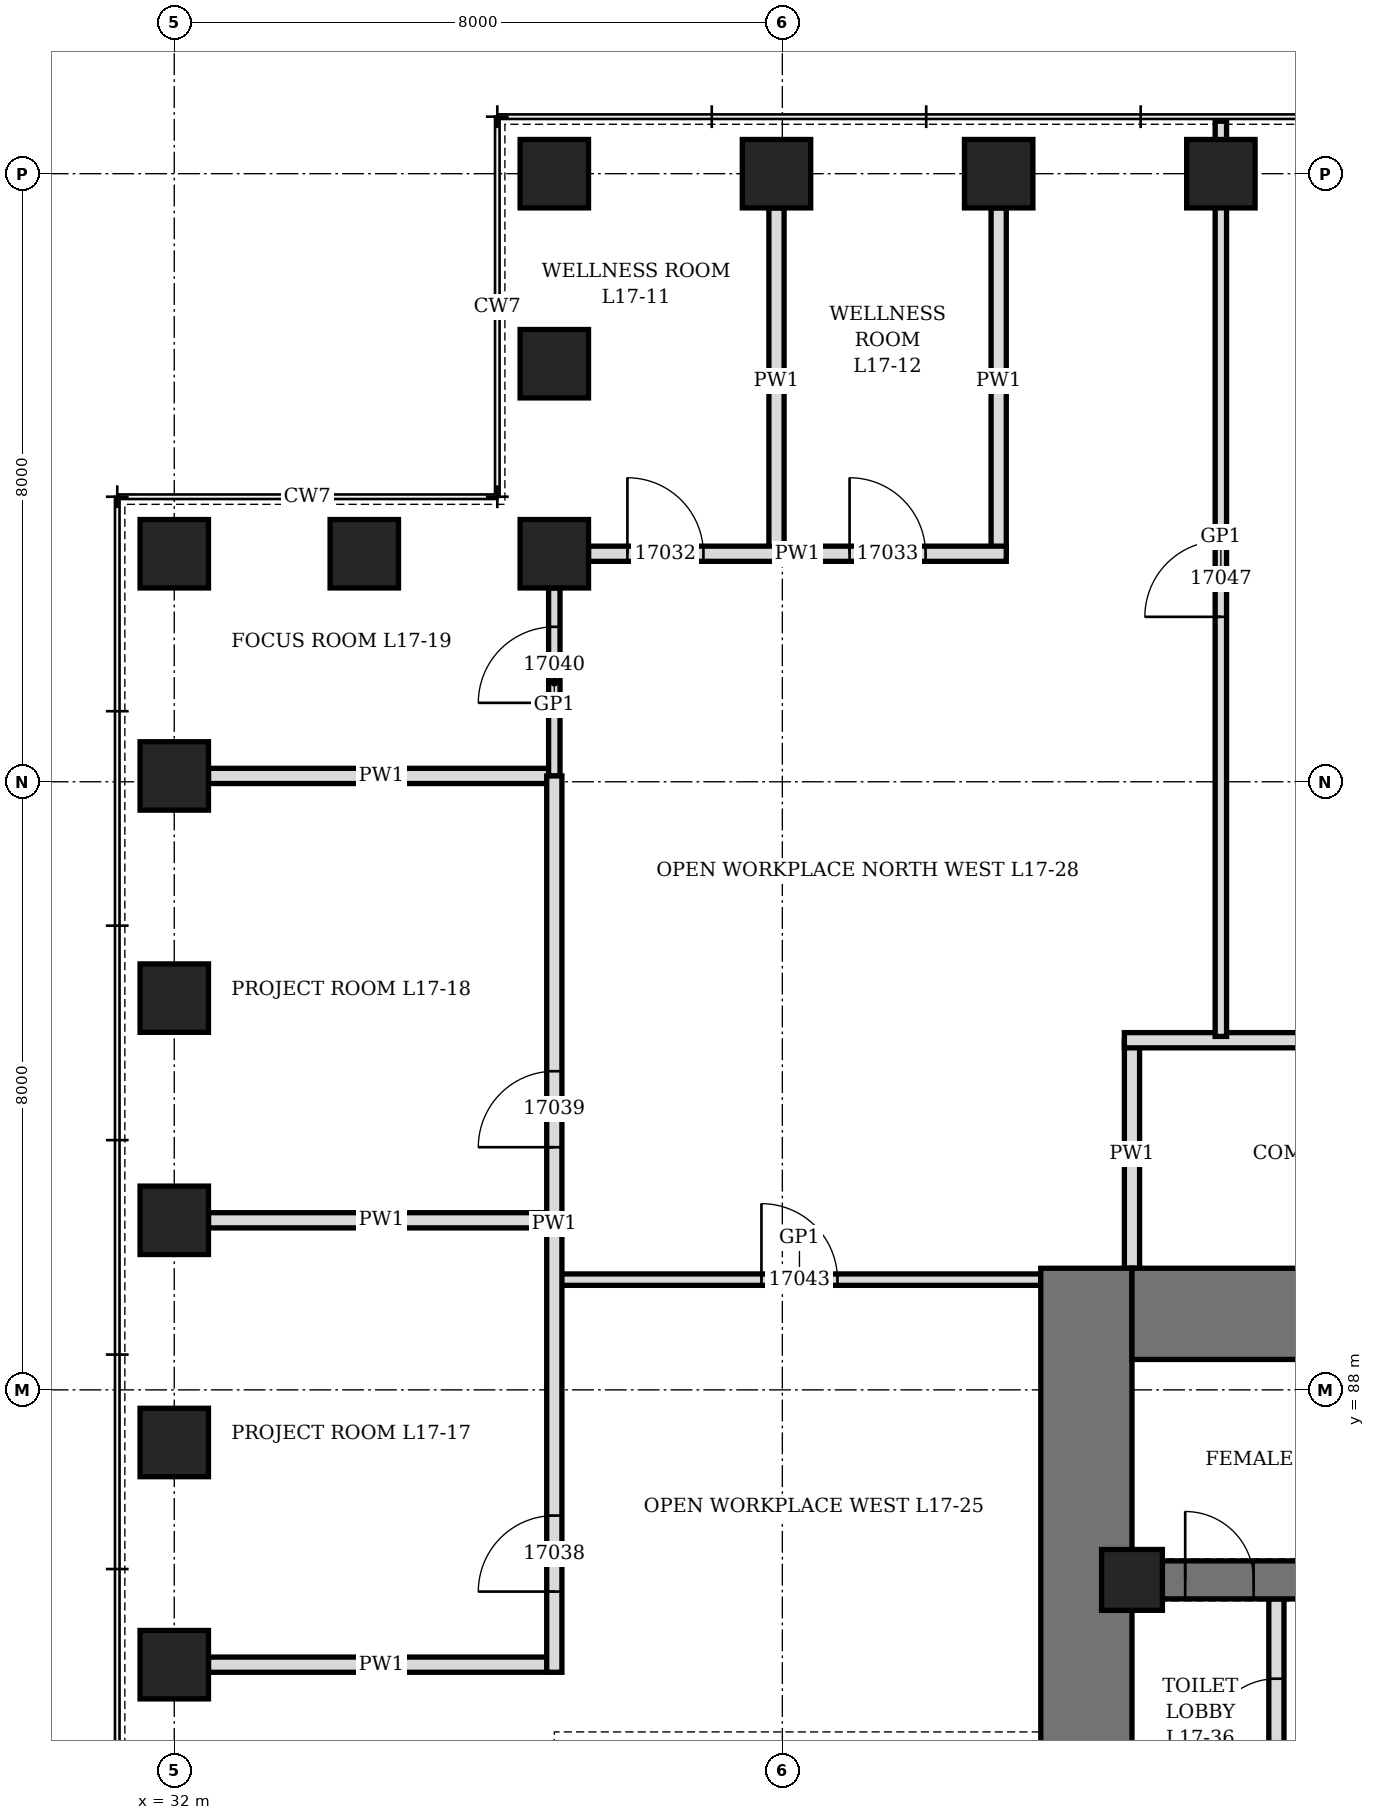
"""IFC4 building model, lengths in metres.
Left out: names, types, materials, properties, quantities, classifications, styles, units other than length and angle.
Written with IfcOpenShell. Run it as: python <this file> out.ifc"""

import sys

from ifc_helpers import new_model, si_unit, direction, frame, frame_2d, origin, origin_2d, place, context, subcontext, project, spatial, rectangle, hollow_rectangle, extrude, element, fill, save


model = new_model("IFC4")
c1 = context("Model", 3, precision=1e-05, world=origin(), true_north=direction((0.0, 1.0)))
c2 = subcontext(c1, "Body", "Model", "MODEL_VIEW")
j1 = project(units=[si_unit("LENGTHUNIT", "METRE"), si_unit("PLANEANGLEUNIT", "RADIAN")], contexts=[c1])
p1 = place(None, origin())
s1 = spatial("IfcSite", under=j1, at=p1, CompositionType="ELEMENT")
p2 = place(p1, origin())
s2 = spatial("IfcBuilding", under=s1, at=p2, CompositionType="ELEMENT")
p3 = place(p2, frame((0.0, 0.0, 81.1)))
s3 = spatial("IfcBuildingStorey", under=s2, at=p3, CompositionType="ELEMENT", Elevation=81.1)
for number, where, z_axis, x_axis in (
    (1, (45.769, 104.0, 0.0), (0.0, 0.0, 1.0), (1.0, 0.0, 0.0)),
    (2, (42.846, 104.0, 0.0), (0.0, 0.0, 1.0), (1.0, 0.0, 0.0)),
    (3, (39.923, 104.0, 0.0), (0.0, 0.0, 1.0), (1.0, 0.0, 0.0)),
    (4, (37.0, 104.0, 0.0), (0.0, 0.0, 1.0), (0.0, 1.0, 0.0)),
    (5, (37.0, 101.5, 0.0), (0.0, 0.0, 1.0), (0.0, 1.0, 0.0)),
    (6, (37.0, 99.0, 0.0), (0.0, 0.0, 1.0), (1.0, 0.0, 0.0)),
    (7, (34.5, 99.0, 0.0), (0.0, 0.0, 1.0), (1.0, 0.0, 0.0)),
    (8, (32.0, 99.0, 0.0), (0.0, 0.0, 1.0), (0.0, 1.0, 0.0)),
    (9, (32.0, 96.077, 0.0), (0.0, 0.0, 1.0), (0.0, 1.0, 0.0)),
    (10, (32.0, 93.154, 0.0), (0.0, 0.0, 1.0), (0.0, 1.0, 0.0)),
    (11, (32.0, 90.231, 0.0), (0.0, 0.0, 1.0), (0.0, 1.0, 0.0)),
    (12, (32.0, 87.308, 0.0), (0.0, 0.0, 1.0), (0.0, 1.0, 0.0)),
    (13, (32.0, 84.385, 0.0), (0.0, 0.0, 1.0), (0.0, 1.0, 0.0)),
):
    element("IfcColumn", number, at=place(p3, frame(where, z_axis=z_axis, x_axis=x_axis)), inside=s3, PredefinedType="COLUMN", context=c2, shape_type="SweptSolid", body=[
        extrude(hollow_rectangle(XDim=0.9, YDim=0.9, WallThickness=0.12, at=origin_2d()), origin(), (0.0, 0.0, 1.0), 4.2),
    ])
p4 = place(p3, frame((44.0, 70.4, 0.0), z_axis=(0.0, 0.0, 1.0), x_axis=(0.0, 1.0, 0.0)))
e14 = element("IfcWall", 14, at=p4, inside=s3, PredefinedType="SHEAR", context=c2, shape_type="SweptSolid", body=[
    extrude(rectangle(XDim=19.2, YDim=1.2, at=frame_2d((9.6, 0.0))), origin(), (0.0, 0.0, 1.0), 4.2),
])
p5 = place(p4, frame((8.6, 0.0, 0.0)))
e15 = element("IfcOpeningElement", 15, at=p5, cuts=e14, PredefinedType="OPENING", context=c2, shape_type="SweptSolid", body=[
    extrude(rectangle(XDim=2.0, YDim=2.4, at=frame_2d((1.0, 1.2))), frame((0.0, 0.61, 0.0), z_axis=(0.0, -1.0, 0.0), x_axis=(1.0, 0.0, 0.0)), (0.0, 0.0, 1.0), 1.22),
])
p6 = place(p3, frame((44.6, 89.0, 0.0), z_axis=(0.0, 0.0, 1.0), x_axis=(1.0, 0.0, 0.0)))
e16 = element("IfcWall", 16, at=p6, inside=s3, PredefinedType="SHEAR", context=c2, shape_type="SweptSolid", body=[
    extrude(rectangle(XDim=22.8, YDim=1.2, at=frame_2d((11.4, 0.0))), origin(), (0.0, 0.0, 1.0), 4.2),
])
p7 = place(p6, frame((6.55, 0.0, 0.0)))
e17 = element("IfcOpeningElement", 17, at=p7, cuts=e16, PredefinedType="OPENING", context=c2, shape_type="SweptSolid", body=[
    extrude(rectangle(XDim=1.0, YDim=2.1, at=frame_2d((0.5, 1.05))), frame((0.0, 0.61, 0.0), z_axis=(0.0, -1.0, 0.0), x_axis=(1.0, 0.0, 0.0)), (0.0, 0.0, 1.0), 1.22),
])
p8 = place(p6, frame((9.45, 0.0, 0.0)))
e18 = element("IfcOpeningElement", 18, at=p8, cuts=e16, PredefinedType="OPENING", context=c2, shape_type="SweptSolid", body=[
    extrude(rectangle(XDim=0.9, YDim=2.1, at=frame_2d((0.45, 1.05))), frame((0.0, 0.61, 0.0), z_axis=(0.0, -1.0, 0.0), x_axis=(1.0, 0.0, 0.0)), (0.0, 0.0, 1.0), 1.22),
])
p9 = place(p6, frame((12.05, 0.0, 0.0)))
e19 = element("IfcOpeningElement", 19, at=p9, cuts=e16, PredefinedType="OPENING", context=c2, shape_type="SweptSolid", body=[
    extrude(rectangle(XDim=0.9, YDim=2.1, at=frame_2d((0.45, 1.05))), frame((0.0, 0.61, 0.0), z_axis=(0.0, -1.0, 0.0), x_axis=(1.0, 0.0, 0.0)), (0.0, 0.0, 1.0), 1.22),
])
p10 = place(p6, frame((13.975, 0.0, 0.0)))
e20 = element("IfcOpeningElement", 20, at=p10, cuts=e16, PredefinedType="OPENING", context=c2, shape_type="SweptSolid", body=[
    extrude(rectangle(XDim=0.9, YDim=2.1, at=frame_2d((0.45, 1.05))), frame((0.0, 0.61, 0.0), z_axis=(0.0, -1.0, 0.0), x_axis=(1.0, 0.0, 0.0)), (0.0, 0.0, 1.0), 1.22),
])
p11 = place(p3, frame((44.6, 85.5, 0.0), z_axis=(0.0, 0.0, 1.0), x_axis=(1.0, 0.0, 0.0)))
e21 = element("IfcWall", 21, at=p11, inside=s3, PredefinedType="SHEAR", context=c2, shape_type="SweptSolid", body=[
    extrude(rectangle(XDim=5.15, YDim=0.5, at=frame_2d((2.575, 0.0))), origin(), (0.0, 0.0, 1.0), 4.2),
])
p12 = place(p11, frame((0.7, 0.0, 0.0)))
e22 = element("IfcOpeningElement", 22, at=p12, cuts=e21, PredefinedType="OPENING", context=c2, shape_type="SweptSolid", body=[
    extrude(rectangle(XDim=0.9, YDim=2.1, at=frame_2d((0.45, 1.05))), frame((0.0, 0.26, 0.0), z_axis=(0.0, -1.0, 0.0), x_axis=(1.0, 0.0, 0.0)), (0.0, 0.0, 1.0), 0.52),
])
p13 = place(p3, frame((44.6, 85.5, 0.0), z_axis=(0.0, 0.0, 1.0), x_axis=(1.0, 0.0, 0.0)))
e23 = element("IfcColumn", 23, at=p13, inside=s3, PredefinedType="COLUMN", context=c2, shape_type="SweptSolid", body=[
    extrude(hollow_rectangle(XDim=0.8, YDim=0.8, WallThickness=0.1, at=origin_2d()), origin(), (0.0, 0.0, 1.0), 4.2),
])
p14 = place(p3, frame((46.5, 82.25, 0.0), z_axis=(0.0, 0.0, 1.0), x_axis=(0.0, 1.0, 0.0)))
e24 = element("IfcWall", 24, at=p14, inside=s3, PredefinedType="PARTITIONING", context=c2, shape_type="SweptSolid", body=[
    extrude(rectangle(XDim=3.0, YDim=0.2, at=frame_2d((1.5, 0.0))), origin(), (0.0, 0.0, 1.0), 4.04),
])
p15 = place(p14, frame((1.05, 0.0, 0.0)))
e25 = element("IfcOpeningElement", 25, at=p15, cuts=e24, PredefinedType="OPENING", context=c2, shape_type="SweptSolid", body=[
    extrude(rectangle(XDim=0.9, YDim=2.1, at=frame_2d((0.45, 1.05))), frame((0.0, 0.11, 0.0), z_axis=(0.0, -1.0, 0.0), x_axis=(1.0, 0.0, 0.0)), (0.0, 0.0, 1.0), 0.22),
])
p16 = place(p3, frame((39.923, 99.0, 0.0), z_axis=(0.0, 0.0, 1.0), x_axis=(0.0, 1.0, 0.0)))
e26 = element("IfcWall", 26, at=p16, inside=s3, PredefinedType="PARTITIONING", context=c2, shape_type="SweptSolid", body=[
    extrude(rectangle(XDim=4.55, YDim=0.2, at=frame_2d((2.275, 0.0))), origin(), (0.0, 0.0, 1.0), 3.428),
])
p17 = place(p3, frame((42.846, 99.0, 0.0), z_axis=(0.0, 0.0, 1.0), x_axis=(0.0, 1.0, 0.0)))
e27 = element("IfcWall", 27, at=p17, inside=s3, PredefinedType="PARTITIONING", context=c2, shape_type="SweptSolid", body=[
    extrude(rectangle(XDim=4.55, YDim=0.2, at=frame_2d((2.275, 0.0))), origin(), (0.0, 0.0, 1.0), 3.278),
])
for number, where, z_axis, x_axis in (
    (28, (32.45, 84.385, 0.0), (0.0, 0.0, 1.0), (1.0, 0.0, 0.0)),
    (29, (32.45, 90.231, 0.0), (0.0, 0.0, 1.0), (1.0, 0.0, 0.0)),
    (30, (32.45, 96.077, 0.0), (0.0, 0.0, 1.0), (1.0, 0.0, 0.0)),
):
    element("IfcWall", number, at=place(p3, frame(where, z_axis=z_axis, x_axis=x_axis)), inside=s3, PredefinedType="PARTITIONING", context=c2, shape_type="SweptSolid", body=[
        extrude(rectangle(XDim=4.55, YDim=0.2, at=frame_2d((2.275, 0.0))), origin(), (0.0, 0.0, 1.0), 3.428),
    ])
p18 = place(p3, frame((44.6, 89.6, 0.0), z_axis=(0.0, 0.0, 1.0), x_axis=(0.0, 1.0, 0.0)))
e31 = element("IfcWall", 31, at=p18, inside=s3, PredefinedType="PARTITIONING", context=c2, shape_type="SweptSolid", body=[
    extrude(rectangle(XDim=3.0, YDim=0.2, at=frame_2d((1.5, 0.0))), origin(), (0.0, 0.0, 1.0), 4.04),
])
p19 = place(p3, frame((37.05, 89.45, 0.0), z_axis=(0.0, 0.0, 1.0), x_axis=(1.0, 0.0, 0.0)))
e32 = element("IfcWall", 32, at=p19, inside=s3, PredefinedType="PARTITIONING", context=c2, shape_type="SweptSolid", body=[
    extrude(rectangle(XDim=6.35, YDim=0.15, at=frame_2d((3.175, 0.0))), origin(), (0.0, 0.0, 1.0), 4.04),
])
p20 = place(p19, frame((2.675, 0.0, 0.0)))
e33 = element("IfcOpeningElement", 33, at=p20, cuts=e32, PredefinedType="OPENING", context=c2, shape_type="SweptSolid", body=[
    extrude(rectangle(XDim=1.0, YDim=2.4, at=frame_2d((0.5, 1.2))), frame((0.0, 0.085, 0.0), z_axis=(0.0, -1.0, 0.0), x_axis=(1.0, 0.0, 0.0)), (0.0, 0.0, 1.0), 0.17),
])
p21 = place(p3, frame((44.5, 92.6, 0.0), z_axis=(0.0, 0.0, 1.0), x_axis=(1.0, 0.0, 0.0)))
e34 = element("IfcWall", 34, at=p21, inside=s3, PredefinedType="PARTITIONING", context=c2, shape_type="SweptSolid", body=[
    extrude(rectangle(XDim=6.4, YDim=0.2, at=frame_2d((3.2, 0.0))), origin(), (0.0, 0.0, 1.0), 4.04),
])
p22 = place(p21, frame((2.7, 0.0, 0.0)))
e35 = element("IfcOpeningElement", 35, at=p22, cuts=e34, PredefinedType="OPENING", context=c2, shape_type="SweptSolid", body=[
    extrude(rectangle(XDim=1.0, YDim=2.1, at=frame_2d((0.5, 1.05))), frame((0.0, 0.11, 0.0), z_axis=(0.0, -1.0, 0.0), x_axis=(1.0, 0.0, 0.0)), (0.0, 0.0, 1.0), 0.22),
])
p23 = place(p3, frame((37.45, 99.0, 0.0), z_axis=(0.0, 0.0, 1.0), x_axis=(1.0, 0.0, 0.0)))
e36 = element("IfcWall", 36, at=p23, inside=s3, PredefinedType="PARTITIONING", context=c2, shape_type="SweptSolid", body=[
    extrude(rectangle(XDim=5.496, YDim=0.2, at=frame_2d((2.748, 0.0))), origin(), (0.0, 0.0, 1.0), 4.04),
])
p24 = place(p23, frame((0.511, 0.0, 0.0)))
e37 = element("IfcOpeningElement", 37, at=p24, cuts=e36, PredefinedType="OPENING", context=c2, shape_type="SweptSolid", body=[
    extrude(rectangle(XDim=1.0, YDim=2.1, at=frame_2d((0.5, 1.05))), frame((0.0, 0.11, 0.0), z_axis=(0.0, -1.0, 0.0), x_axis=(1.0, 0.0, 0.0)), (0.0, 0.0, 1.0), 0.22),
])
p25 = place(p23, frame((3.435, 0.0, 0.0)))
e38 = element("IfcOpeningElement", 38, at=p25, cuts=e36, PredefinedType="OPENING", context=c2, shape_type="SweptSolid", body=[
    extrude(rectangle(XDim=1.0, YDim=2.1, at=frame_2d((0.5, 1.05))), frame((0.0, 0.11, 0.0), z_axis=(0.0, -1.0, 0.0), x_axis=(1.0, 0.0, 0.0)), (0.0, 0.0, 1.0), 0.22),
])
p26 = place(p3, frame((37.0, 96.077, 0.0), z_axis=(0.0, 0.0, 1.0), x_axis=(0.0, 1.0, 0.0)))
e39 = element("IfcWall", 39, at=p26, inside=s3, PredefinedType="PARTITIONING", context=c2, shape_type="SweptSolid", body=[
    extrude(rectangle(XDim=2.473, YDim=0.15, at=frame_2d((1.237, 0.0))), origin(), (0.0, 0.0, 1.0), 4.04),
])
p27 = place(p26, frame((0.961, 0.0, 0.0)))
e40 = element("IfcOpeningElement", 40, at=p27, cuts=e39, PredefinedType="OPENING", context=c2, shape_type="SweptSolid", body=[
    extrude(rectangle(XDim=1.0, YDim=2.4, at=frame_2d((0.5, 1.2))), frame((0.0, 0.085, 0.0), z_axis=(0.0, -1.0, 0.0), x_axis=(1.0, 0.0, 0.0)), (0.0, 0.0, 1.0), 0.17),
])
p28 = place(p3, frame((37.0, 84.285, 0.0), z_axis=(0.0, 0.0, 1.0), x_axis=(0.0, 1.0, 0.0)))
e41 = element("IfcWall", 41, at=p28, inside=s3, PredefinedType="PARTITIONING", context=c2, shape_type="SweptSolid", body=[
    extrude(rectangle(XDim=11.792, YDim=0.2, at=frame_2d((5.896, 0.0))), origin(), (0.0, 0.0, 1.0), 4.04),
])
p29 = place(p28, frame((1.062, 0.0, 0.0)))
e42 = element("IfcOpeningElement", 42, at=p29, cuts=e41, PredefinedType="OPENING", context=c2, shape_type="SweptSolid", body=[
    extrude(rectangle(XDim=1.0, YDim=2.1, at=frame_2d((0.5, 1.05))), frame((0.0, 0.11, 0.0), z_axis=(0.0, -1.0, 0.0), x_axis=(1.0, 0.0, 0.0)), (0.0, 0.0, 1.0), 0.22),
])
p30 = place(p28, frame((6.908, 0.0, 0.0)))
e43 = element("IfcOpeningElement", 43, at=p30, cuts=e41, PredefinedType="OPENING", context=c2, shape_type="SweptSolid", body=[
    extrude(rectangle(XDim=1.0, YDim=2.1, at=frame_2d((0.5, 1.05))), frame((0.0, 0.11, 0.0), z_axis=(0.0, -1.0, 0.0), x_axis=(1.0, 0.0, 0.0)), (0.0, 0.0, 1.0), 0.22),
])
p31 = place(p3, frame((45.769, 92.65, 0.0), z_axis=(0.0, 0.0, 1.0), x_axis=(0.0, 1.0, 0.0)))
e44 = element("IfcWall", 44, at=p31, inside=s3, PredefinedType="PARTITIONING", context=c2, shape_type="SweptSolid", body=[
    extrude(rectangle(XDim=12.04, YDim=0.15, at=frame_2d((6.02, 0.0))), origin(), (0.0, 0.0, 1.0), 3.278),
])
p32 = place(p31, frame((5.52, 0.0, 0.0)))
e45 = element("IfcOpeningElement", 45, at=p32, cuts=e44, PredefinedType="OPENING", context=c2, shape_type="SweptSolid", body=[
    extrude(rectangle(XDim=1.0, YDim=2.4, at=frame_2d((0.5, 1.2))), frame((0.0, 0.085, 0.0), z_axis=(0.0, -1.0, 0.0), x_axis=(1.0, 0.0, 0.0)), (0.0, 0.0, 1.0), 0.17),
])
p33 = place(p15, origin())
e46 = element("IfcDoor", 46, at=p33, inside=s3, OperationType="SINGLE_SWING_RIGHT", PredefinedType="DOOR", context=c2, shape_type="SweptSolid", body=[
    extrude(rectangle(XDim=0.9, YDim=2.1, at=frame_2d((0.45, 1.05))), frame((0.0, 0.1, 0.0), z_axis=(0.0, -1.0, 0.0), x_axis=(1.0, 0.0, 0.0)), (0.0, 0.0, 1.0), 0.199),
])
fill(e25, e46)
p34 = place(p12, origin())
e47 = element("IfcDoor", 47, at=p34, inside=s3, OperationType="SINGLE_SWING_RIGHT", PredefinedType="DOOR", context=c2, shape_type="SweptSolid", body=[
    extrude(rectangle(XDim=0.9, YDim=2.1, at=frame_2d((0.45, 1.05))), frame((0.0, 0.25, 0.0), z_axis=(0.0, -1.0, 0.0), x_axis=(1.0, 0.0, 0.0)), (0.0, 0.0, 1.0), 0.5),
])
fill(e22, e47)
p35 = place(p24, origin())
e48 = element("IfcDoor", 48, at=p35, inside=s3, OperationType="SINGLE_SWING_LEFT", PredefinedType="DOOR", context=c2, shape_type="SweptSolid", body=[
    extrude(rectangle(XDim=1.0, YDim=2.1, at=frame_2d((0.5, 1.05))), frame((0.0, 0.1, 0.0), z_axis=(0.0, -1.0, 0.0), x_axis=(1.0, 0.0, 0.0)), (0.0, 0.0, 1.0), 0.199),
])
fill(e37, e48)
p36 = place(p25, origin())
e49 = element("IfcDoor", 49, at=p36, inside=s3, OperationType="SINGLE_SWING_LEFT", PredefinedType="DOOR", context=c2, shape_type="SweptSolid", body=[
    extrude(rectangle(XDim=1.0, YDim=2.1, at=frame_2d((0.5, 1.05))), frame((0.0, 0.1, 0.0), z_axis=(0.0, -1.0, 0.0), x_axis=(1.0, 0.0, 0.0)), (0.0, 0.0, 1.0), 0.199),
])
fill(e38, e49)
p37 = place(p29, origin())
e50 = element("IfcDoor", 50, at=p37, inside=s3, OperationType="SINGLE_SWING_LEFT", PredefinedType="DOOR", context=c2, shape_type="SweptSolid", body=[
    extrude(rectangle(XDim=1.0, YDim=2.1, at=frame_2d((0.5, 1.05))), frame((0.0, 0.1, 0.0), z_axis=(0.0, -1.0, 0.0), x_axis=(1.0, 0.0, 0.0)), (0.0, 0.0, 1.0), 0.199),
])
fill(e42, e50)
p38 = place(p30, origin())
e51 = element("IfcDoor", 51, at=p38, inside=s3, OperationType="SINGLE_SWING_LEFT", PredefinedType="DOOR", context=c2, shape_type="SweptSolid", body=[
    extrude(rectangle(XDim=1.0, YDim=2.1, at=frame_2d((0.5, 1.05))), frame((0.0, 0.1, 0.0), z_axis=(0.0, -1.0, 0.0), x_axis=(1.0, 0.0, 0.0)), (0.0, 0.0, 1.0), 0.199),
])
fill(e43, e51)
p39 = place(p27, origin())
e52 = element("IfcDoor", 52, at=p39, inside=s3, OperationType="SINGLE_SWING_RIGHT", PredefinedType="DOOR", context=c2, shape_type="SweptSolid", body=[
    extrude(rectangle(XDim=1.0, YDim=2.4, at=frame_2d((0.5, 1.2))), frame((0.0, 0.075, 0.0), z_axis=(0.0, -1.0, 0.0), x_axis=(1.0, 0.0, 0.0)), (0.0, 0.0, 1.0), 0.149),
])
fill(e40, e52)
p40 = place(p20, origin())
e53 = element("IfcDoor", 53, at=p40, inside=s3, OperationType="SINGLE_SWING_RIGHT", PredefinedType="DOOR", context=c2, shape_type="SweptSolid", body=[
    extrude(rectangle(XDim=1.0, YDim=2.4, at=frame_2d((0.5, 1.2))), frame((0.0, 0.075, 0.0), z_axis=(0.0, -1.0, 0.0), x_axis=(1.0, 0.0, 0.0)), (0.0, 0.0, 1.0), 0.149),
])
fill(e33, e53)
p41 = place(p32, origin())
e54 = element("IfcDoor", 54, at=p41, inside=s3, OperationType="SINGLE_SWING_RIGHT", PredefinedType="DOOR", context=c2, shape_type="SweptSolid", body=[
    extrude(rectangle(XDim=1.0, YDim=2.4, at=frame_2d((0.5, 1.2))), frame((0.0, 0.075, 0.0), z_axis=(0.0, -1.0, 0.0), x_axis=(1.0, 0.0, 0.0)), (0.0, 0.0, 1.0), 0.149),
])
fill(e45, e54)
save(model, sys.argv[1])
